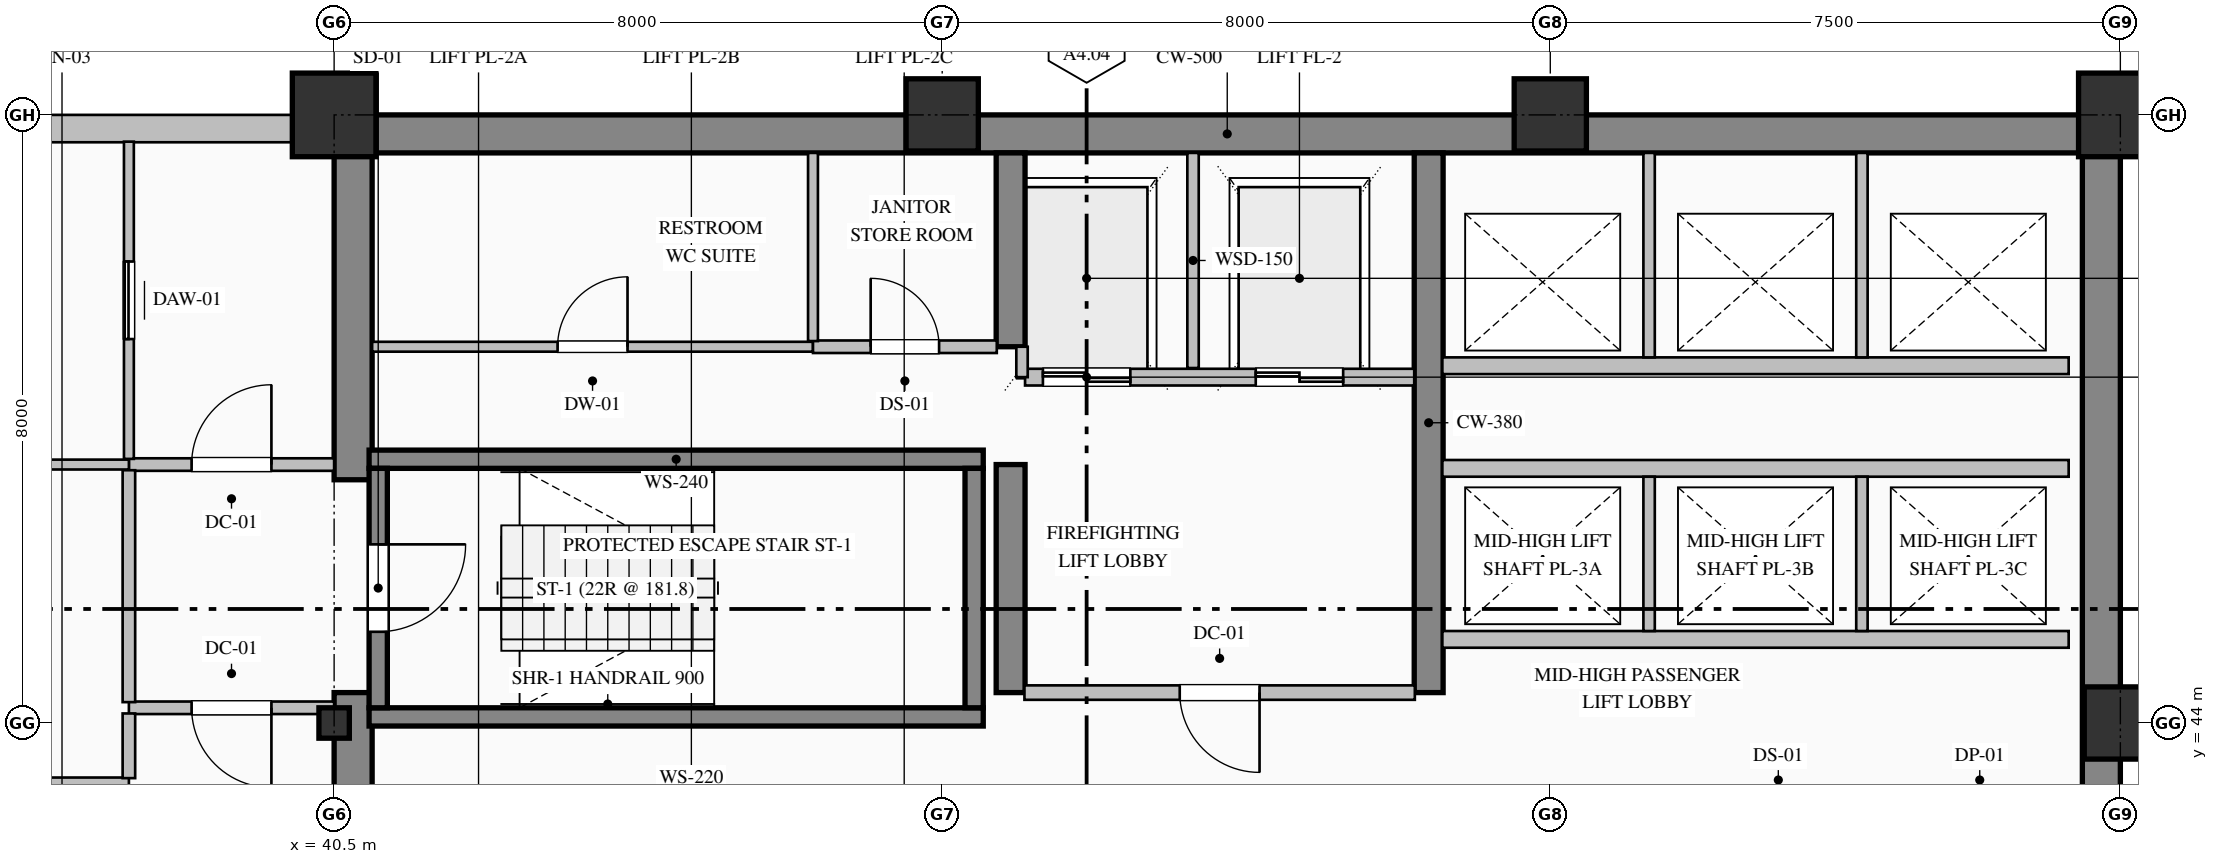
"""IFC4 building model, lengths in metres.
Left out: names, types, materials, properties, quantities, classifications, styles, units other than length and angle.
Written with IfcOpenShell. Run it as: python <this file> out.ifc"""

import sys

from ifc_helpers import new_model, si_unit, direction, frame, frame_2d, origin, origin_2d, place, context, subcontext, project, spatial, rectangle, hollow_rectangle, i_section, extrude, element, fill, save


model = new_model("IFC4")
c1 = context("Model", 3, precision=1e-05, world=origin(), true_north=direction((0.0, 1.0)))
c2 = subcontext(c1, "Body", "Model", "MODEL_VIEW")
j1 = project(units=[si_unit("LENGTHUNIT", "METRE"), si_unit("PLANEANGLEUNIT", "RADIAN")], contexts=[c1])
p1 = place(None, origin())
s1 = spatial("IfcSite", under=j1, at=p1, CompositionType="ELEMENT")
p2 = place(p1, origin())
s2 = spatial("IfcBuilding", under=s1, at=p2, CompositionType="ELEMENT")
p3 = place(p2, frame((0.0, 0.0, 159.0)))
s3 = spatial("IfcBuildingStorey", under=s2, at=p3, CompositionType="ELEMENT", Elevation=159.0)
p4 = place(p3, frame((40.5, 51.75, 0.0), z_axis=(0.0, 0.0, 1.0), x_axis=(1.0, 0.0, 0.0)))
e1 = element("IfcWall", 1, at=p4, inside=s3, PredefinedType="SHEAR", context=c2, shape_type="SweptSolid", body=[
    extrude(rectangle(XDim=23.5, YDim=0.5, at=frame_2d((11.75, 0.0))), origin(), (0.0, 0.0, 1.0), 3.765),
])
p5 = place(p3, frame((63.75, 36.32, 0.0), z_axis=(0.0, 0.0, 1.0), x_axis=(0.0, 1.0, 0.0)))
e2 = element("IfcWall", 2, at=p5, inside=s3, PredefinedType="SHEAR", context=c2, shape_type="SweptSolid", body=[
    extrude(rectangle(XDim=15.18, YDim=0.5, at=frame_2d((7.59, 0.0))), origin(), (0.0, 0.0, 1.0), 3.765),
])
p6 = place(p3, frame((40.75, 36.5, 0.0), z_axis=(0.0, 0.0, 1.0), x_axis=(0.0, 1.0, 0.0)))
e3 = element("IfcWall", 3, at=p6, inside=s3, PredefinedType="SHEAR", context=c2, shape_type="SweptSolid", body=[
    extrude(rectangle(XDim=7.9, YDim=0.5, at=frame_2d((3.95, 0.0))), origin(), (0.0, 0.0, 1.0), 3.765),
])
p7 = place(p3, frame((40.75, 47.2, 0.0), z_axis=(0.0, 0.0, 1.0), x_axis=(0.0, 1.0, 0.0)))
e4 = element("IfcWall", 4, at=p7, inside=s3, PredefinedType="SHEAR", context=c2, shape_type="SweptSolid", body=[
    extrude(rectangle(XDim=4.3, YDim=0.5, at=frame_2d((2.15, 0.0))), origin(), (0.0, 0.0, 1.0), 3.765),
])
p8 = place(p3, frame((49.4, 44.4, 0.0), z_axis=(0.0, 0.0, 1.0), x_axis=(0.0, 1.0, 0.0)))
e5 = element("IfcWall", 5, at=p8, inside=s3, PredefinedType="SHEAR", context=c2, shape_type="SweptSolid", body=[
    extrude(rectangle(XDim=3.0, YDim=0.38, at=frame_2d((1.5, 0.0))), origin(), (0.0, 0.0, 1.0), 3.765),
])
p9 = place(p3, frame((49.4, 48.95, 0.0), z_axis=(0.0, 0.0, 1.0), x_axis=(0.0, 1.0, 0.0)))
e6 = element("IfcWall", 6, at=p9, inside=s3, PredefinedType="SHEAR", context=c2, shape_type="SweptSolid", body=[
    extrude(rectangle(XDim=2.55, YDim=0.38, at=frame_2d((1.275, 0.0))), origin(), (0.0, 0.0, 1.0), 3.765),
])
p10 = place(p3, frame((54.9, 44.4, 0.0), z_axis=(0.0, 0.0, 1.0), x_axis=(0.0, 1.0, 0.0)))
e7 = element("IfcWall", 7, at=p10, inside=s3, PredefinedType="SHEAR", context=c2, shape_type="SweptSolid", body=[
    extrude(rectangle(XDim=7.1, YDim=0.38, at=frame_2d((3.55, 0.0))), origin(), (0.0, 0.0, 1.0), 3.765),
])
p11 = place(p3, frame((40.5, 44.0, 0.0), z_axis=(0.0, 0.0, 1.0), x_axis=(1.0, 0.0, 0.0)))
e8 = element("IfcColumn", 8, at=p11, inside=s3, PredefinedType="COLUMN", context=c2, shape_type="SweptSolid", body=[
    extrude(i_section(OverallWidth=0.4, OverallDepth=0.4, WebThickness=0.013, FlangeThickness=0.021, FilletRadius=0.022, at=origin_2d()), origin(), (0.0, 0.0, 1.0), 4.0),
])
p12 = place(p3, frame((40.5, 52.0, 0.0), z_axis=(0.0, 0.0, 1.0), x_axis=(1.0, 0.0, 0.0)))
e9 = element("IfcColumn", 9, at=p12, inside=s3, PredefinedType="COLUMN", context=c2, shape_type="SweptSolid", body=[
    extrude(hollow_rectangle(XDim=1.1, YDim=1.1, WallThickness=0.04, at=origin_2d()), origin(), (0.0, 0.0, 1.0), 4.0),
])
for number, where, z_axis, x_axis in (
    (10, (48.5, 52.0, 0.0), (0.0, 0.0, 1.0), (1.0, 0.0, 0.0)),
    (11, (56.5, 52.0, 0.0), (0.0, 0.0, 1.0), (1.0, 0.0, 0.0)),
    (12, (64.0, 44.0, 0.0), (0.0, 0.0, 1.0), (1.0, 0.0, 0.0)),
):
    element("IfcColumn", number, at=place(p3, frame(where, z_axis=z_axis, x_axis=x_axis)), inside=s3, PredefinedType="COLUMN", context=c2, shape_type="SweptSolid", body=[
        extrude(hollow_rectangle(XDim=0.95, YDim=0.95, WallThickness=0.036, at=origin_2d()), origin(), (0.0, 0.0, 1.0), 4.0),
    ])
p13 = place(p3, frame((64.0, 52.0, 0.0), z_axis=(0.0, 0.0, 1.0), x_axis=(1.0, 0.0, 0.0)))
e13 = element("IfcColumn", 13, at=p13, inside=s3, PredefinedType="COLUMN", context=c2, shape_type="SweptSolid", body=[
    extrude(hollow_rectangle(XDim=1.1, YDim=1.1, WallThickness=0.04, at=origin_2d()), origin(), (0.0, 0.0, 1.0), 4.0),
])
p14 = place(p3, frame((13.0, 51.82, 0.0), z_axis=(0.0, 0.0, 1.0), x_axis=(1.0, 0.0, 0.0)))
e14 = element("IfcWall", 14, at=p14, inside=s3, PredefinedType="SOLIDWALL", context=c2, shape_type="SweptSolid", body=[
    extrude(rectangle(XDim=27.52, YDim=0.36, at=frame_2d((13.76, 0.0))), origin(), (0.0, 0.0, 1.0), 3.265),
])
p15 = place(p14, frame((6.6, 0.0, 0.7)))
e15 = element("IfcOpeningElement", 15, at=p15, cuts=e14, PredefinedType="OPENING", context=c2, shape_type="SweptSolid", body=[
    extrude(rectangle(XDim=1.2, YDim=1.85, at=frame_2d((0.6, 0.925))), frame((0.0, 0.19, 0.0), z_axis=(0.0, -1.0, 0.0), x_axis=(1.0, 0.0, 0.0)), (0.0, 0.0, 1.0), 0.38),
])
p16 = place(p14, frame((13.575, 0.0, 0.85)))
e16 = element("IfcOpeningElement", 16, at=p16, cuts=e14, PredefinedType="OPENING", context=c2, shape_type="SweptSolid", body=[
    extrude(rectangle(XDim=1.65, YDim=1.95, at=frame_2d((0.825, 0.975))), frame((0.0, 0.19, 0.0), z_axis=(0.0, -1.0, 0.0), x_axis=(1.0, 0.0, 0.0)), (0.0, 0.0, 1.0), 0.38),
])
for number, where, z_axis, x_axis in (
    (17, (40.96, 47.47, 0.0), (0.0, 0.0, 1.0), (1.0, 0.0, 0.0)),
    (18, (49.04, 44.08, 0.0), (0.0, 0.0, 1.0), (-1.0, 0.0, 0.0)),
):
    element("IfcWall", number, at=place(p3, frame(where, z_axis=z_axis, x_axis=x_axis)), inside=s3, PredefinedType="SOLIDWALL", context=c2, shape_type="SweptSolid", body=[
        extrude(rectangle(XDim=8.08, YDim=0.24, at=frame_2d((4.04, 0.0))), origin(), (0.0, 0.0, 1.0), 4.0),
    ])
p17 = place(p3, frame((41.08, 47.35, 0.0), z_axis=(0.0, 0.0, 1.0), x_axis=(0.0, -1.0, 0.0)))
e19 = element("IfcWall", 19, at=p17, inside=s3, PredefinedType="SOLIDWALL", context=c2, shape_type="SweptSolid", body=[
    extrude(rectangle(XDim=3.15, YDim=0.24, at=frame_2d((1.575, 0.0))), origin(), (0.0, 0.0, 1.0), 4.0),
])
p18 = place(p17, frame((1.0, 0.0, 0.0)))
e20 = element("IfcOpeningElement", 20, at=p18, cuts=e19, PredefinedType="OPENING", context=c2, shape_type="SweptSolid", body=[
    extrude(rectangle(XDim=1.15, YDim=2.2, at=frame_2d((0.575, 1.1))), frame((0.0, 0.13, 0.0), z_axis=(0.0, -1.0, 0.0), x_axis=(1.0, 0.0, 0.0)), (0.0, 0.0, 1.0), 0.26),
])
p19 = place(p3, frame((48.92, 44.2, 0.0), z_axis=(0.0, 0.0, 1.0), x_axis=(0.0, 1.0, 0.0)))
e21 = element("IfcWall", 21, at=p19, inside=s3, PredefinedType="SOLIDWALL", context=c2, shape_type="SweptSolid", body=[
    extrude(rectangle(XDim=3.15, YDim=0.24, at=frame_2d((1.575, 0.0))), origin(), (0.0, 0.0, 1.0), 4.0),
])
p20 = place(p3, frame((54.71, 48.55, 0.0), z_axis=(0.0, 0.0, 1.0), x_axis=(-1.0, 0.0, 0.0)))
e22 = element("IfcWall", 22, at=p20, inside=s3, PredefinedType="PARTITIONING", context=c2, shape_type="SweptSolid", body=[
    extrude(rectangle(XDim=5.12, YDim=0.22, at=frame_2d((2.56, 0.0))), origin(), (0.0, 0.0, 1.0), 3.765),
])
p21 = place(p20, frame((3.735, 0.0, 0.0)))
e23 = element("IfcOpeningElement", 23, at=p21, cuts=e22, PredefinedType="OPENING", context=c2, shape_type="SweptSolid", body=[
    extrude(rectangle(XDim=1.15, YDim=2.2, at=frame_2d((0.575, 1.1))), frame((0.0, 0.12, 0.0), z_axis=(0.0, -1.0, 0.0), x_axis=(1.0, 0.0, 0.0)), (0.0, 0.0, 1.0), 0.24),
])
p22 = place(p20, frame((0.935, 0.0, 0.0)))
e24 = element("IfcOpeningElement", 24, at=p22, cuts=e22, PredefinedType="OPENING", context=c2, shape_type="SweptSolid", body=[
    extrude(rectangle(XDim=1.15, YDim=2.2, at=frame_2d((0.575, 1.1))), frame((0.0, 0.12, 0.0), z_axis=(0.0, -1.0, 0.0), x_axis=(1.0, 0.0, 0.0)), (0.0, 0.0, 1.0), 0.24),
])
p23 = place(p3, frame((51.8, 48.67, 0.0), z_axis=(0.0, 0.0, 1.0), x_axis=(0.0, 1.0, 0.0)))
e25 = element("IfcWall", 25, at=p23, inside=s3, PredefinedType="PARTITIONING", context=c2, shape_type="SweptSolid", body=[
    extrude(rectangle(XDim=2.83, YDim=0.15, at=frame_2d((1.415, 0.0))), origin(), (0.0, 0.0, 1.0), 3.765),
])
p24 = place(p3, frame((49.55, 48.55, 0.0), z_axis=(0.0, 0.0, 1.0), x_axis=(0.0, 1.0, 0.0)))
e26 = element("IfcWall", 26, at=p24, inside=s3, PredefinedType="PARTITIONING", context=c2, shape_type="SweptSolid", body=[
    extrude(rectangle(XDim=0.4, YDim=0.15, at=frame_2d((0.2, 0.0))), origin(), (0.0, 0.0, 1.0), 3.765),
])
for number, where, z_axis, x_axis in (
    (27, (63.32, 45.1, 0.0), (0.0, 0.0, 1.0), (-1.0, 0.0, 0.0)),
    (28, (55.08, 47.35, 0.0), (0.0, 0.0, 1.0), (1.0, 0.0, 0.0)),
):
    element("IfcWall", number, at=place(p3, frame(where, z_axis=z_axis, x_axis=x_axis)), inside=s3, PredefinedType="PARTITIONING", context=c2, shape_type="SweptSolid", body=[
        extrude(rectangle(XDim=8.24, YDim=0.22, at=frame_2d((4.12, 0.0))), origin(), (0.0, 0.0, 1.0), 3.765),
    ])
for number, where, z_axis, x_axis in (
    (29, (57.8, 45.21, 0.0), (0.0, 0.0, 1.0), (0.0, 1.0, 0.0)),
    (30, (60.6, 45.21, 0.0), (0.0, 0.0, 1.0), (0.0, 1.0, 0.0)),
):
    element("IfcWall", number, at=place(p3, frame(where, z_axis=z_axis, x_axis=x_axis)), inside=s3, PredefinedType="PARTITIONING", context=c2, shape_type="SweptSolid", body=[
        extrude(rectangle(XDim=2.03, YDim=0.15, at=frame_2d((1.015, 0.0))), origin(), (0.0, 0.0, 1.0), 3.765),
    ])
p25 = place(p3, frame((63.32, 48.7, 0.0), z_axis=(0.0, 0.0, 1.0), x_axis=(-1.0, 0.0, 0.0)))
e31 = element("IfcWall", 31, at=p25, inside=s3, PredefinedType="PARTITIONING", context=c2, shape_type="SweptSolid", body=[
    extrude(rectangle(XDim=8.24, YDim=0.22, at=frame_2d((4.12, 0.0))), origin(), (0.0, 0.0, 1.0), 3.765),
])
for number, where, z_axis, x_axis in (
    (32, (57.8, 48.81, 0.0), (0.0, 0.0, 1.0), (0.0, 1.0, 0.0)),
    (33, (60.6, 48.81, 0.0), (0.0, 0.0, 1.0), (0.0, 1.0, 0.0)),
):
    element("IfcWall", number, at=place(p3, frame(where, z_axis=z_axis, x_axis=x_axis)), inside=s3, PredefinedType="PARTITIONING", context=c2, shape_type="SweptSolid", body=[
        extrude(rectangle(XDim=2.69, YDim=0.15, at=frame_2d((1.345, 0.0))), origin(), (0.0, 0.0, 1.0), 3.765),
    ])
p26 = place(p3, frame((37.8, 47.4, 0.0), z_axis=(0.0, 0.0, 1.0), x_axis=(1.0, 0.0, 0.0)))
e34 = element("IfcWall", 34, at=p26, inside=s3, PredefinedType="PARTITIONING", context=c2, shape_type="SweptSolid", body=[
    extrude(rectangle(XDim=2.7, YDim=0.165, at=frame_2d((1.35, 0.0))), origin(), (0.0, 0.0, 1.0), 3.765),
])
p27 = place(p26, frame((0.825, 0.0, 0.0)))
e35 = element("IfcOpeningElement", 35, at=p27, cuts=e34, PredefinedType="OPENING", context=c2, shape_type="SweptSolid", body=[
    extrude(rectangle(XDim=1.05, YDim=2.15, at=frame_2d((0.525, 1.075))), frame((0.0, 0.093, 0.0), z_axis=(0.0, -1.0, 0.0), x_axis=(1.0, 0.0, 0.0)), (0.0, 0.0, 1.0), 0.185),
])
p28 = place(p3, frame((40.5, 44.2, 0.0), z_axis=(0.0, 0.0, 1.0), x_axis=(-1.0, 0.0, 0.0)))
e36 = element("IfcWall", 36, at=p28, inside=s3, PredefinedType="PARTITIONING", context=c2, shape_type="SweptSolid", body=[
    extrude(rectangle(XDim=2.7, YDim=0.165, at=frame_2d((1.35, 0.0))), origin(), (0.0, 0.0, 1.0), 3.765),
])
p29 = place(p28, frame((0.825, 0.0, 0.0)))
e37 = element("IfcOpeningElement", 37, at=p29, cuts=e36, PredefinedType="OPENING", context=c2, shape_type="SweptSolid", body=[
    extrude(rectangle(XDim=1.05, YDim=2.15, at=frame_2d((0.525, 1.075))), frame((0.0, 0.093, 0.0), z_axis=(0.0, -1.0, 0.0), x_axis=(1.0, 0.0, 0.0)), (0.0, 0.0, 1.0), 0.185),
])
p30 = place(p3, frame((37.8, 44.274, 0.0), z_axis=(0.0, 0.0, 1.0), x_axis=(0.0, 1.0, 0.0)))
e38 = element("IfcWall", 38, at=p30, inside=s3, PredefinedType="PARTITIONING", context=c2, shape_type="SweptSolid", body=[
    extrude(rectangle(XDim=3.051, YDim=0.165, at=frame_2d((1.525, 0.0))), origin(), (0.0, 0.0, 1.0), 3.765),
])
p31 = place(p3, frame((37.8, 47.475, 0.0), z_axis=(0.0, 0.0, 1.0), x_axis=(0.0, 1.0, 0.0)))
e39 = element("IfcWall", 39, at=p31, inside=s3, PredefinedType="PARTITIONING", context=c2, shape_type="SweptSolid", body=[
    extrude(rectangle(XDim=4.173, YDim=0.13, at=frame_2d((2.087, 0.0))), origin(), (0.0, 0.0, 1.0), 3.765),
])
p32 = place(p31, frame((1.577, 0.0, 0.0)))
e40 = element("IfcOpeningElement", 40, at=p32, cuts=e39, PredefinedType="OPENING", context=c2, shape_type="SweptSolid", body=[
    extrude(rectangle(XDim=1.02, YDim=2.15, at=frame_2d((0.51, 1.075))), frame((0.0, 0.075, 0.0), z_axis=(0.0, -1.0, 0.0), x_axis=(1.0, 0.0, 0.0)), (0.0, 0.0, 1.0), 0.15),
])
p33 = place(p3, frame((37.8, 47.4, 0.0), z_axis=(0.0, 0.0, 1.0), x_axis=(-1.0, 0.0, 0.0)))
e41 = element("IfcWall", 41, at=p33, inside=s3, PredefinedType="PARTITIONING", context=c2, shape_type="SweptSolid", body=[
    extrude(rectangle(XDim=2.4, YDim=0.13, at=frame_2d((1.2, 0.0))), origin(), (0.0, 0.0, 1.0), 3.765),
])
p34 = place(p3, frame((41.0, 48.95, 0.0), z_axis=(0.0, 0.0, 1.0), x_axis=(1.0, 0.0, 0.0)))
e42 = element("IfcWall", 42, at=p34, inside=s3, PredefinedType="PARTITIONING", context=c2, shape_type="SweptSolid", body=[
    extrude(rectangle(XDim=5.8, YDim=0.13, at=frame_2d((2.9, 0.0))), origin(), (0.0, 0.0, 1.0), 3.765),
])
p35 = place(p34, frame((2.44, 0.0, 0.0)))
e43 = element("IfcOpeningElement", 43, at=p35, cuts=e42, PredefinedType="OPENING", context=c2, shape_type="SweptSolid", body=[
    extrude(rectangle(XDim=0.92, YDim=2.15, at=frame_2d((0.46, 1.075))), frame((0.0, 0.075, 0.0), z_axis=(0.0, -1.0, 0.0), x_axis=(1.0, 0.0, 0.0)), (0.0, 0.0, 1.0), 0.15),
])
p36 = place(p3, frame((46.8, 48.95, 0.0), z_axis=(0.0, 0.0, 1.0), x_axis=(1.0, 0.0, 0.0)))
e44 = element("IfcWall", 44, at=p36, inside=s3, PredefinedType="PARTITIONING", context=c2, shape_type="SweptSolid", body=[
    extrude(rectangle(XDim=2.418, YDim=0.165, at=frame_2d((1.209, 0.0))), origin(), (0.0, 0.0, 1.0), 3.765),
])
p37 = place(p36, frame((0.759, 0.0, 0.0)))
e45 = element("IfcOpeningElement", 45, at=p37, cuts=e44, PredefinedType="OPENING", context=c2, shape_type="SweptSolid", body=[
    extrude(rectangle(XDim=0.9, YDim=2.15, at=frame_2d((0.45, 1.075))), frame((0.0, 0.093, 0.0), z_axis=(0.0, -1.0, 0.0), x_axis=(1.0, 0.0, 0.0)), (0.0, 0.0, 1.0), 0.185),
])
p38 = place(p3, frame((54.718, 44.4, 0.0), z_axis=(0.0, 0.0, 1.0), x_axis=(-1.0, 0.0, 0.0)))
e46 = element("IfcWall", 46, at=p38, inside=s3, PredefinedType="PARTITIONING", context=c2, shape_type="SweptSolid", body=[
    extrude(rectangle(XDim=5.136, YDim=0.19, at=frame_2d((2.568, 0.0))), origin(), (0.0, 0.0, 1.0), 3.765),
])
p39 = place(p38, frame((2.043, 0.0, 0.0)))
e47 = element("IfcOpeningElement", 47, at=p39, cuts=e46, PredefinedType="OPENING", context=c2, shape_type="SweptSolid", body=[
    extrude(rectangle(XDim=1.05, YDim=2.15, at=frame_2d((0.525, 1.075))), frame((0.0, 0.105, 0.0), z_axis=(0.0, -1.0, 0.0), x_axis=(1.0, 0.0, 0.0)), (0.0, 0.0, 1.0), 0.21),
])
p40 = place(p3, frame((46.8, 51.5, 0.0), z_axis=(0.0, 0.0, 1.0), x_axis=(0.0, -1.0, 0.0)))
e48 = element("IfcWall", 48, at=p40, inside=s3, PredefinedType="PARTITIONING", context=c2, shape_type="SweptSolid", body=[
    extrude(rectangle(XDim=2.476, YDim=0.13, at=frame_2d((1.238, 0.0))), origin(), (0.0, 0.0, 1.0), 3.765),
])
p41 = place(p3, frame((24.5, 43.2, 0.0), z_axis=(0.0, 0.0, 1.0), x_axis=(1.0, 0.0, 0.0)))
e49 = element("IfcWall", 49, at=p41, inside=s3, PredefinedType="PARTITIONING", context=c2, shape_type="SweptSolid", body=[
    extrude(rectangle(XDim=13.3, YDim=0.165, at=frame_2d((6.65, 0.0))), origin(), (0.0, 0.0, 1.0), 3.765),
])
p42 = place(p41, frame((6.15, 0.0, 0.0)))
e50 = element("IfcOpeningElement", 50, at=p42, cuts=e49, PredefinedType="OPENING", context=c2, shape_type="SweptSolid", body=[
    extrude(rectangle(XDim=1.0, YDim=2.15, at=frame_2d((0.5, 1.075))), frame((0.0, 0.093, 0.0), z_axis=(0.0, -1.0, 0.0), x_axis=(1.0, 0.0, 0.0)), (0.0, 0.0, 1.0), 0.185),
])
p43 = place(p3, frame((37.8, 43.274, 0.0), z_axis=(0.0, 0.0, 1.0), x_axis=(0.0, 1.0, 0.0)))
e51 = element("IfcWall", 51, at=p43, inside=s3, PredefinedType="PARTITIONING", context=c2, shape_type="SweptSolid", body=[
    extrude(rectangle(XDim=0.851, YDim=0.165, at=frame_2d((0.426, 0.0))), origin(), (0.0, 0.0, 1.0), 3.765),
])
p44 = place(p18, origin())
e52 = element("IfcDoor", 52, at=p44, inside=s3, OperationType="SINGLE_SWING_LEFT", PredefinedType="DOOR", context=c2, shape_type="SweptSolid", body=[
    extrude(rectangle(XDim=1.15, YDim=2.2, at=frame_2d((0.575, 1.1))), frame((0.0, 0.025, 0.0), z_axis=(0.0, -1.0, 0.0), x_axis=(1.0, 0.0, 0.0)), (0.0, 0.0, 1.0), 0.05),
])
fill(e20, e52)
p45 = place(p21, origin())
e53 = element("IfcDoor", 53, at=p45, inside=s3, OperationType="DOUBLE_DOOR_SLIDING", PredefinedType="DOOR", context=c2, shape_type="SweptSolid", body=[
    extrude(rectangle(XDim=1.15, YDim=2.2, at=frame_2d((0.575, 1.1))), frame((0.0, 0.025, 0.0), z_axis=(0.0, -1.0, 0.0), x_axis=(1.0, 0.0, 0.0)), (0.0, 0.0, 1.0), 0.05),
])
fill(e23, e53)
p46 = place(p22, origin())
e54 = element("IfcDoor", 54, at=p46, inside=s3, OperationType="DOUBLE_DOOR_SLIDING", PredefinedType="DOOR", context=c2, shape_type="SweptSolid", body=[
    extrude(rectangle(XDim=1.15, YDim=2.2, at=frame_2d((0.575, 1.1))), frame((0.0, 0.025, 0.0), z_axis=(0.0, -1.0, 0.0), x_axis=(1.0, 0.0, 0.0)), (0.0, 0.0, 1.0), 0.05),
])
fill(e24, e54)
p47 = place(p39, origin())
e55 = element("IfcDoor", 55, at=p47, inside=s3, OperationType="SINGLE_SWING_LEFT", PredefinedType="DOOR", context=c2, shape_type="SweptSolid", body=[
    extrude(rectangle(XDim=1.05, YDim=2.15, at=frame_2d((0.525, 1.075))), frame((0.0, 0.025, 0.0), z_axis=(0.0, -1.0, 0.0), x_axis=(1.0, 0.0, 0.0)), (0.0, 0.0, 1.0), 0.05),
])
fill(e47, e55)
p48 = place(p27, origin())
e56 = element("IfcDoor", 56, at=p48, inside=s3, OperationType="SINGLE_SWING_RIGHT", PredefinedType="DOOR", context=c2, shape_type="SweptSolid", body=[
    extrude(rectangle(XDim=1.05, YDim=2.15, at=frame_2d((0.525, 1.075))), frame((0.0, 0.025, 0.0), z_axis=(0.0, -1.0, 0.0), x_axis=(1.0, 0.0, 0.0)), (0.0, 0.0, 1.0), 0.05),
])
fill(e35, e56)
p49 = place(p29, origin())
e57 = element("IfcDoor", 57, at=p49, inside=s3, OperationType="SINGLE_SWING_LEFT", PredefinedType="DOOR", context=c2, shape_type="SweptSolid", body=[
    extrude(rectangle(XDim=1.05, YDim=2.15, at=frame_2d((0.525, 1.075))), frame((0.0, 0.025, 0.0), z_axis=(0.0, -1.0, 0.0), x_axis=(1.0, 0.0, 0.0)), (0.0, 0.0, 1.0), 0.05),
])
fill(e37, e57)
p50 = place(p32, origin())
e58 = element("IfcDoor", 58, at=p50, inside=s3, OperationType="SLIDING_TO_LEFT", PredefinedType="DOOR", context=c2, shape_type="SweptSolid", body=[
    extrude(rectangle(XDim=1.02, YDim=2.15, at=frame_2d((0.51, 1.075))), frame((0.0, 0.025, 0.0), z_axis=(0.0, -1.0, 0.0), x_axis=(1.0, 0.0, 0.0)), (0.0, 0.0, 1.0), 0.05),
])
fill(e40, e58)
p51 = place(p35, origin())
e59 = element("IfcDoor", 59, at=p51, inside=s3, OperationType="SINGLE_SWING_RIGHT", PredefinedType="DOOR", context=c2, shape_type="SweptSolid", body=[
    extrude(rectangle(XDim=0.92, YDim=2.15, at=frame_2d((0.46, 1.075))), frame((0.0, 0.025, 0.0), z_axis=(0.0, -1.0, 0.0), x_axis=(1.0, 0.0, 0.0)), (0.0, 0.0, 1.0), 0.05),
])
fill(e43, e59)
p52 = place(p37, origin())
e60 = element("IfcDoor", 60, at=p52, inside=s3, OperationType="SINGLE_SWING_LEFT", PredefinedType="DOOR", context=c2, shape_type="SweptSolid", body=[
    extrude(rectangle(XDim=0.9, YDim=2.15, at=frame_2d((0.45, 1.075))), frame((0.0, 0.025, 0.0), z_axis=(0.0, -1.0, 0.0), x_axis=(1.0, 0.0, 0.0)), (0.0, 0.0, 1.0), 0.05),
])
fill(e45, e60)
save(model, sys.argv[1])
